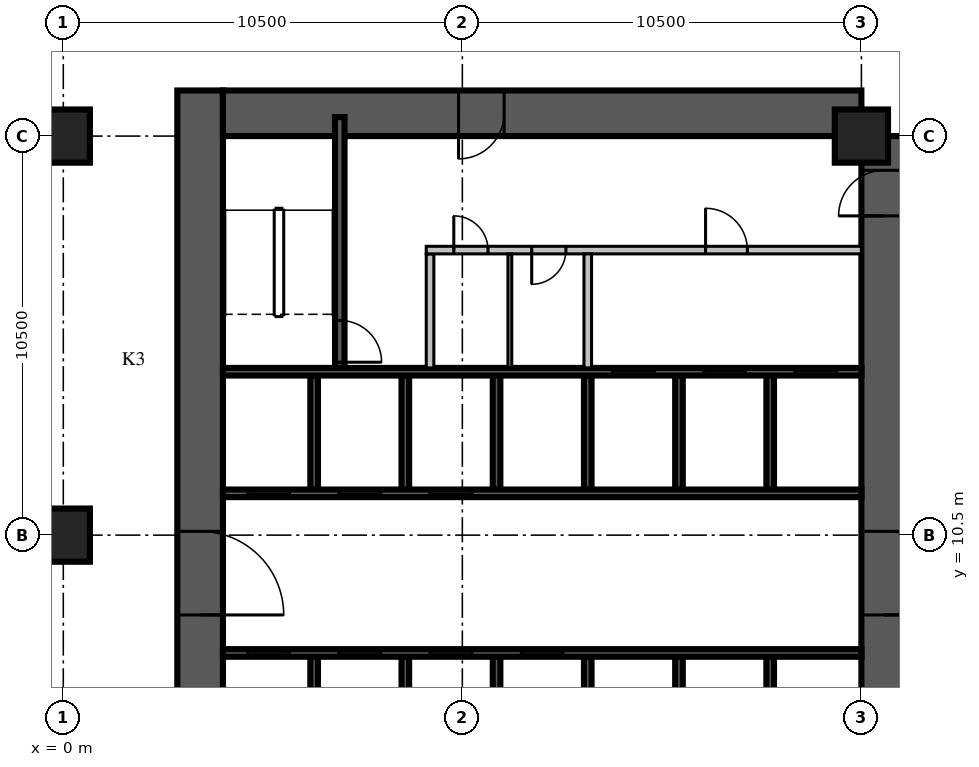
"""IFC4 building model, lengths in metres.
Left out: names, types, materials, properties, quantities, classifications, styles, units other than length and angle.
Written with IfcOpenShell. Run it as: python <this file> out.ifc"""

import sys

from ifc_helpers import new_model, si_unit, direction, frame, frame_2d, origin, origin_2d, place, context, subcontext, project, spatial, rectangle, extrude, source, transform, mapped, element, fill, save


model = new_model("IFC4")
c1 = context("Model", 3, precision=1e-05, world=origin(), true_north=direction((0.0, 1.0)))
c2 = subcontext(c1, "Body", "Model", "MODEL_VIEW")
j1 = project(units=[si_unit("LENGTHUNIT", "METRE"), si_unit("PLANEANGLEUNIT", "RADIAN")], contexts=[c1])
p1 = place(None, origin())
s1 = spatial("IfcSite", under=j1, at=p1, CompositionType="ELEMENT")
p2 = place(p1, origin())
s2 = spatial("IfcBuilding", under=s1, at=p2, CompositionType="ELEMENT")
p3 = place(p2, frame((0.0, 0.0, -9.0)))
s3 = spatial("IfcBuildingStorey", under=s2, at=p3, CompositionType="ELEMENT", Elevation=-9.0)
m1 = source(origin(), c2, "Body", "SweptSolid", [
    extrude(rectangle(XDim=1.4, YDim=1.4, at=origin_2d()), origin(), (0.0, 0.0, 1.0), 4.5),
])
for number, where, z_axis, x_axis in (
    (1, (0.0, 10.5, 0.0), (0.0, 0.0, 1.0), (1.0, 0.0, 0.0)),
    (2, (0.0, 21.0, 0.0), (0.0, 0.0, 1.0), (1.0, 0.0, 0.0)),
    (3, (21.0, 21.0, 0.0), (0.0, 0.0, 1.0), (1.0, 0.0, 0.0)),
):
    element("IfcColumn", number, at=place(p3, frame(where, z_axis=z_axis, x_axis=x_axis)), inside=s3, PredefinedType="COLUMN", context=c2, shape_type="MappedRepresentation", body=[
        mapped(m1, transform((0.0, 0.0, 0.0), scale=1.0)),
    ])
m2 = source(origin(), c2, "Body", "SweptSolid", [
    extrude(rectangle(XDim=18.0, YDim=1.2, at=frame_2d((9.0, 0.0))), origin(), (0.0, 0.0, 1.0), 4.5),
])
p4 = place(p3, frame((3.6, 4.2, 0.0), z_axis=(0.0, 0.0, 1.0), x_axis=(0.0, 1.0, 0.0)))
e4 = element("IfcWall", 4, at=p4, inside=s3, PredefinedType="SHEAR", context=c2, shape_type="MappedRepresentation", body=[
    mapped(m2, transform((0.0, 0.0, 0.0), scale=1.0)),
])
m3 = source(origin(), c2, "Body", "SweptSolid", [
    extrude(rectangle(XDim=2.2, YDim=2.1, at=frame_2d((1.1, 1.05))), frame((0.0, 0.61, 0.0), z_axis=(0.0, -1.0, 0.0), x_axis=(1.0, 0.0, 0.0)), (0.0, 0.0, 1.0), 1.22),
])
p5 = place(p4, frame((4.2, 0.0, 0.0)))
e5 = element("IfcOpeningElement", 5, at=p5, cuts=e4, PredefinedType="OPENING", context=c2, shape_type="MappedRepresentation", body=[
    mapped(m3, transform((0.0, 0.0, 0.0), scale=1.0)),
])
m4 = source(origin(), c2, "Body", "SweptSolid", [
    extrude(rectangle(XDim=16.8, YDim=1.2, at=frame_2d((8.4, 0.0))), origin(), (0.0, 0.0, 1.0), 4.5),
])
p6 = place(p3, frame((21.6, 4.2, 0.0), z_axis=(0.0, 0.0, 1.0), x_axis=(0.0, 1.0, 0.0)))
e6 = element("IfcWall", 6, at=p6, inside=s3, PredefinedType="SHEAR", context=c2, shape_type="MappedRepresentation", body=[
    mapped(m4, transform((0.0, 0.0, 0.0), scale=1.0)),
])
p7 = place(p6, frame((4.2, 0.0, 0.0)))
e7 = element("IfcOpeningElement", 7, at=p7, cuts=e6, PredefinedType="OPENING", context=c2, shape_type="MappedRepresentation", body=[
    mapped(m3, transform((0.0, 0.0, 0.0), scale=1.0)),
])
m5 = source(origin(), c2, "Body", "SweptSolid", [
    extrude(rectangle(XDim=1.2, YDim=2.1, at=frame_2d((0.6, 1.05))), frame((0.0, 0.61, 0.0), z_axis=(0.0, -1.0, 0.0), x_axis=(1.0, 0.0, 0.0)), (0.0, 0.0, 1.0), 1.22),
])
p8 = place(p6, frame((14.7, 0.0, 0.0)))
e8 = element("IfcOpeningElement", 8, at=p8, cuts=e6, PredefinedType="OPENING", context=c2, shape_type="MappedRepresentation", body=[
    mapped(m5, transform((0.0, 0.0, 0.0), scale=1.0)),
])
p9 = place(p3, frame((4.2, 21.6, 0.0), z_axis=(0.0, 0.0, 1.0), x_axis=(1.0, 0.0, 0.0)))
e9 = element("IfcWall", 9, at=p9, inside=s3, PredefinedType="SHEAR", context=c2, shape_type="MappedRepresentation", body=[
    mapped(m4, transform((0.0, 0.0, 0.0), scale=1.0)),
])
p10 = place(p9, frame((6.2, 0.0, 0.0)))
e10 = element("IfcOpeningElement", 10, at=p10, cuts=e9, PredefinedType="OPENING", context=c2, shape_type="MappedRepresentation", body=[
    mapped(m5, transform((0.0, 0.0, 0.0), scale=1.0)),
])
m6 = source(origin(), c2, "Body", "SweptSolid", [
    extrude(rectangle(XDim=3.1, YDim=0.2, at=frame_2d((1.55, 0.0))), origin(), (0.0, 0.0, 1.0), 4.5),
])
for number, where, z_axis, x_axis in (
    (11, (6.6, 4.2, 0.0), (0.0, 0.0, 1.0), (0.0, 1.0, 0.0)),
    (12, (9.0, 4.2, 0.0), (0.0, 0.0, 1.0), (0.0, 1.0, 0.0)),
    (13, (11.4, 4.2, 0.0), (0.0, 0.0, 1.0), (0.0, 1.0, 0.0)),
    (14, (13.8, 4.2, 0.0), (0.0, 0.0, 1.0), (0.0, 1.0, 0.0)),
    (15, (16.2, 4.2, 0.0), (0.0, 0.0, 1.0), (0.0, 1.0, 0.0)),
    (16, (18.6, 4.2, 0.0), (0.0, 0.0, 1.0), (0.0, 1.0, 0.0)),
):
    element("IfcWall", number, at=place(p3, frame(where, z_axis=z_axis, x_axis=x_axis)), inside=s3, PredefinedType="SOLIDWALL", context=c2, shape_type="MappedRepresentation", body=[
        mapped(m6, transform((0.0, 0.0, 0.0), scale=1.0)),
    ])
m7 = source(origin(), c2, "Body", "SweptSolid", [
    extrude(rectangle(XDim=3.0, YDim=0.2, at=frame_2d((1.5, 0.0))), origin(), (0.0, 0.0, 1.0), 4.5),
])
for number, where, z_axis, x_axis in (
    (17, (6.6, 11.7, 0.0), (0.0, 0.0, 1.0), (0.0, 1.0, 0.0)),
    (18, (9.0, 11.7, 0.0), (0.0, 0.0, 1.0), (0.0, 1.0, 0.0)),
    (19, (11.4, 11.7, 0.0), (0.0, 0.0, 1.0), (0.0, 1.0, 0.0)),
    (20, (13.8, 11.7, 0.0), (0.0, 0.0, 1.0), (0.0, 1.0, 0.0)),
    (21, (16.2, 11.7, 0.0), (0.0, 0.0, 1.0), (0.0, 1.0, 0.0)),
    (22, (18.6, 11.7, 0.0), (0.0, 0.0, 1.0), (0.0, 1.0, 0.0)),
):
    element("IfcWall", number, at=place(p3, frame(where, z_axis=z_axis, x_axis=x_axis)), inside=s3, PredefinedType="SOLIDWALL", context=c2, shape_type="MappedRepresentation", body=[
        mapped(m7, transform((0.0, 0.0, 0.0), scale=1.0)),
    ])
m8 = source(origin(), c2, "Body", "SweptSolid", [
    extrude(rectangle(XDim=16.8, YDim=0.2, at=frame_2d((8.4, 0.0))), origin(), (0.0, 0.0, 1.0), 4.5),
])
p11 = place(p3, frame((4.2, 7.4, 0.0), z_axis=(0.0, 0.0, 1.0), x_axis=(1.0, 0.0, 0.0)))
e23 = element("IfcWall", 23, at=p11, inside=s3, PredefinedType="SOLIDWALL", context=c2, shape_type="MappedRepresentation", body=[
    mapped(m8, transform((0.0, 0.0, 0.0), scale=1.0)),
])
m9 = source(origin(), c2, "Body", "SweptSolid", [
    extrude(rectangle(XDim=1.1, YDim=2.1, at=frame_2d((0.55, 1.05))), frame((0.0, 0.11, 0.0), z_axis=(0.0, -1.0, 0.0), x_axis=(1.0, 0.0, 0.0)), (0.0, 0.0, 1.0), 0.22),
])
p12 = place(p11, frame((0.65, 0.0, 0.0)))
e24 = element("IfcOpeningElement", 24, at=p12, cuts=e23, PredefinedType="OPENING", context=c2, shape_type="MappedRepresentation", body=[
    mapped(m9, transform((0.0, 0.0, 0.0), scale=1.0)),
])
p13 = place(p11, frame((3.05, 0.0, 0.0)))
e25 = element("IfcOpeningElement", 25, at=p13, cuts=e23, PredefinedType="OPENING", context=c2, shape_type="MappedRepresentation", body=[
    mapped(m9, transform((0.0, 0.0, 0.0), scale=1.0)),
])
p14 = place(p11, frame((5.45, 0.0, 0.0)))
e26 = element("IfcOpeningElement", 26, at=p14, cuts=e23, PredefinedType="OPENING", context=c2, shape_type="MappedRepresentation", body=[
    mapped(m9, transform((0.0, 0.0, 0.0), scale=1.0)),
])
p15 = place(p11, frame((7.85, 0.0, 0.0)))
e27 = element("IfcOpeningElement", 27, at=p15, cuts=e23, PredefinedType="OPENING", context=c2, shape_type="MappedRepresentation", body=[
    mapped(m9, transform((0.0, 0.0, 0.0), scale=1.0)),
])
p16 = place(p3, frame((4.2, 11.6, 0.0), z_axis=(0.0, 0.0, 1.0), x_axis=(1.0, 0.0, 0.0)))
e28 = element("IfcWall", 28, at=p16, inside=s3, PredefinedType="SOLIDWALL", context=c2, shape_type="MappedRepresentation", body=[
    mapped(m8, transform((0.0, 0.0, 0.0), scale=1.0)),
])
p17 = place(p16, frame((0.65, 0.0, 0.0)))
e29 = element("IfcOpeningElement", 29, at=p17, cuts=e28, PredefinedType="OPENING", context=c2, shape_type="MappedRepresentation", body=[
    mapped(m9, transform((0.0, 0.0, 0.0), scale=1.0)),
])
p18 = place(p16, frame((3.05, 0.0, 0.0)))
e30 = element("IfcOpeningElement", 30, at=p18, cuts=e28, PredefinedType="OPENING", context=c2, shape_type="MappedRepresentation", body=[
    mapped(m9, transform((0.0, 0.0, 0.0), scale=1.0)),
])
p19 = place(p16, frame((5.45, 0.0, 0.0)))
e31 = element("IfcOpeningElement", 31, at=p19, cuts=e28, PredefinedType="OPENING", context=c2, shape_type="MappedRepresentation", body=[
    mapped(m9, transform((0.0, 0.0, 0.0), scale=1.0)),
])
p20 = place(p3, frame((4.2, 14.8, 0.0), z_axis=(0.0, 0.0, 1.0), x_axis=(1.0, 0.0, 0.0)))
e32 = element("IfcWall", 32, at=p20, inside=s3, PredefinedType="SOLIDWALL", context=c2, shape_type="MappedRepresentation", body=[
    mapped(m8, transform((0.0, 0.0, 0.0), scale=1.0)),
])
p21 = place(p20, frame((10.25, 0.0, 0.0)))
e33 = element("IfcOpeningElement", 33, at=p21, cuts=e32, PredefinedType="OPENING", context=c2, shape_type="MappedRepresentation", body=[
    mapped(m9, transform((0.0, 0.0, 0.0), scale=1.0)),
])
p22 = place(p20, frame((12.65, 0.0, 0.0)))
e34 = element("IfcOpeningElement", 34, at=p22, cuts=e32, PredefinedType="OPENING", context=c2, shape_type="MappedRepresentation", body=[
    mapped(m9, transform((0.0, 0.0, 0.0), scale=1.0)),
])
p23 = place(p20, frame((15.05, 0.0, 0.0)))
e35 = element("IfcOpeningElement", 35, at=p23, cuts=e32, PredefinedType="OPENING", context=c2, shape_type="MappedRepresentation", body=[
    mapped(m9, transform((0.0, 0.0, 0.0), scale=1.0)),
])
m10 = source(origin(), c2, "Body", "SweptSolid", [
    extrude(rectangle(XDim=6.6, YDim=0.25, at=frame_2d((3.3, 0.0))), origin(), (0.0, 0.0, 1.0), 3.9),
])
p24 = place(p3, frame((7.275, 14.9, 0.0), z_axis=(0.0, 0.0, 1.0), x_axis=(0.0, 1.0, 0.0)))
e36 = element("IfcWall", 36, at=p24, inside=s3, PredefinedType="SOLIDWALL", context=c2, shape_type="MappedRepresentation", body=[
    mapped(m10, transform((0.0, 0.0, 0.0), scale=1.0)),
])
m11 = source(origin(), c2, "Body", "SweptSolid", [
    extrude(rectangle(XDim=1.1, YDim=2.1, at=frame_2d((0.55, 1.05))), frame((0.0, 0.135, 0.0), z_axis=(0.0, -1.0, 0.0), x_axis=(1.0, 0.0, 0.0)), (0.0, 0.0, 1.0), 0.27),
])
p25 = place(p24, frame((0.15, 0.0, 0.0)))
e37 = element("IfcOpeningElement", 37, at=p25, cuts=e36, PredefinedType="OPENING", context=c2, shape_type="MappedRepresentation", body=[
    mapped(m11, transform((0.0, 0.0, 0.0), scale=1.0)),
])
m12 = source(origin(), c2, "Body", "SweptSolid", [
    extrude(rectangle(XDim=3.0, YDim=0.2, at=frame_2d((1.5, 0.0))), origin(), (0.0, 0.0, 1.0), 3.9),
])
p26 = place(p3, frame((9.65, 14.9, 0.0), z_axis=(0.0, 0.0, 1.0), x_axis=(0.0, 1.0, 0.0)))
e38 = element("IfcWall", 38, at=p26, inside=s3, PredefinedType="PARTITIONING", context=c2, shape_type="MappedRepresentation", body=[
    mapped(m12, transform((0.0, 0.0, 0.0), scale=1.0)),
])
m13 = source(origin(), c2, "Body", "SweptSolid", [
    extrude(rectangle(XDim=11.45, YDim=0.2, at=frame_2d((5.725, 0.0))), origin(), (0.0, 0.0, 1.0), 3.9),
])
p27 = place(p3, frame((9.55, 18.0, 0.0), z_axis=(0.0, 0.0, 1.0), x_axis=(1.0, 0.0, 0.0)))
e39 = element("IfcWall", 39, at=p27, inside=s3, PredefinedType="PARTITIONING", context=c2, shape_type="MappedRepresentation", body=[
    mapped(m13, transform((0.0, 0.0, 0.0), scale=1.0)),
])
m14 = source(origin(), c2, "Body", "SweptSolid", [
    extrude(rectangle(XDim=0.9, YDim=2.1, at=frame_2d((0.45, 1.05))), frame((0.0, 0.11, 0.0), z_axis=(0.0, -1.0, 0.0), x_axis=(1.0, 0.0, 0.0)), (0.0, 0.0, 1.0), 0.22),
])
p28 = place(p27, frame((0.725, 0.0, 0.0)))
e40 = element("IfcOpeningElement", 40, at=p28, cuts=e39, PredefinedType="OPENING", context=c2, shape_type="MappedRepresentation", body=[
    mapped(m14, transform((0.0, 0.0, 0.0), scale=1.0)),
])
p29 = place(p27, frame((2.775, 0.0, 0.0)))
e41 = element("IfcOpeningElement", 41, at=p29, cuts=e39, PredefinedType="OPENING", context=c2, shape_type="MappedRepresentation", body=[
    mapped(m14, transform((0.0, 0.0, 0.0), scale=1.0)),
])
p30 = place(p27, frame((7.35, 0.0, 0.0)))
e42 = element("IfcOpeningElement", 42, at=p30, cuts=e39, PredefinedType="OPENING", context=c2, shape_type="MappedRepresentation", body=[
    mapped(m9, transform((0.0, 0.0, 0.0), scale=1.0)),
])
p31 = place(p3, frame((13.8, 14.9, 0.0), z_axis=(0.0, 0.0, 1.0), x_axis=(0.0, 1.0, 0.0)))
e43 = element("IfcWall", 43, at=p31, inside=s3, PredefinedType="PARTITIONING", context=c2, shape_type="MappedRepresentation", body=[
    mapped(m12, transform((0.0, 0.0, 0.0), scale=1.0)),
])
m15 = source(origin(), c2, "Body", "SweptSolid", [
    extrude(rectangle(XDim=3.0, YDim=0.1, at=frame_2d((1.5, 0.0))), origin(), (0.0, 0.0, 1.0), 3.9),
])
p32 = place(p3, frame((11.75, 14.9, 0.0), z_axis=(0.0, 0.0, 1.0), x_axis=(0.0, 1.0, 0.0)))
e44 = element("IfcWall", 44, at=p32, inside=s3, PredefinedType="PARTITIONING", context=c2, shape_type="MappedRepresentation", body=[
    mapped(m15, transform((0.0, 0.0, 0.0), scale=1.0)),
])
m16 = source(origin(), c2, "Body", "SweptSolid", [
    extrude(rectangle(XDim=1.1, YDim=2.1, at=frame_2d((0.55, 1.05))), frame((0.0, 0.025, 0.0), z_axis=(0.0, -1.0, 0.0), x_axis=(1.0, 0.0, 0.0)), (0.0, 0.0, 1.0), 0.05),
])
p33 = place(p12, origin())
e45 = element("IfcDoor", 45, at=p33, inside=s3, OperationType="SLIDING_TO_LEFT", PredefinedType="DOOR", context=c2, shape_type="MappedRepresentation", body=[
    mapped(m16, transform((0.0, 0.0, 0.0), scale=1.0)),
])
fill(e24, e45)
p34 = place(p13, origin())
e46 = element("IfcDoor", 46, at=p34, inside=s3, OperationType="SLIDING_TO_LEFT", PredefinedType="DOOR", context=c2, shape_type="MappedRepresentation", body=[
    mapped(m16, transform((0.0, 0.0, 0.0), scale=1.0)),
])
fill(e25, e46)
p35 = place(p14, origin())
e47 = element("IfcDoor", 47, at=p35, inside=s3, OperationType="SLIDING_TO_LEFT", PredefinedType="DOOR", context=c2, shape_type="MappedRepresentation", body=[
    mapped(m16, transform((0.0, 0.0, 0.0), scale=1.0)),
])
fill(e26, e47)
p36 = place(p15, origin())
e48 = element("IfcDoor", 48, at=p36, inside=s3, OperationType="SLIDING_TO_LEFT", PredefinedType="DOOR", context=c2, shape_type="MappedRepresentation", body=[
    mapped(m16, transform((0.0, 0.0, 0.0), scale=1.0)),
])
fill(e27, e48)
p37 = place(p17, origin())
e49 = element("IfcDoor", 49, at=p37, inside=s3, OperationType="SLIDING_TO_LEFT", PredefinedType="DOOR", context=c2, shape_type="MappedRepresentation", body=[
    mapped(m16, transform((0.0, 0.0, 0.0), scale=1.0)),
])
fill(e29, e49)
p38 = place(p18, origin())
e50 = element("IfcDoor", 50, at=p38, inside=s3, OperationType="SLIDING_TO_LEFT", PredefinedType="DOOR", context=c2, shape_type="MappedRepresentation", body=[
    mapped(m16, transform((0.0, 0.0, 0.0), scale=1.0)),
])
fill(e30, e50)
p39 = place(p19, origin())
e51 = element("IfcDoor", 51, at=p39, inside=s3, OperationType="SLIDING_TO_LEFT", PredefinedType="DOOR", context=c2, shape_type="MappedRepresentation", body=[
    mapped(m16, transform((0.0, 0.0, 0.0), scale=1.0)),
])
fill(e31, e51)
p40 = place(p21, origin())
e52 = element("IfcDoor", 52, at=p40, inside=s3, OperationType="SLIDING_TO_LEFT", PredefinedType="DOOR", context=c2, shape_type="MappedRepresentation", body=[
    mapped(m16, transform((0.0, 0.0, 0.0), scale=1.0)),
])
fill(e33, e52)
p41 = place(p22, origin())
e53 = element("IfcDoor", 53, at=p41, inside=s3, OperationType="SLIDING_TO_LEFT", PredefinedType="DOOR", context=c2, shape_type="MappedRepresentation", body=[
    mapped(m16, transform((0.0, 0.0, 0.0), scale=1.0)),
])
fill(e34, e53)
p42 = place(p23, origin())
e54 = element("IfcDoor", 54, at=p42, inside=s3, OperationType="SLIDING_TO_LEFT", PredefinedType="DOOR", context=c2, shape_type="MappedRepresentation", body=[
    mapped(m16, transform((0.0, 0.0, 0.0), scale=1.0)),
])
fill(e35, e54)
p43 = place(p25, origin())
e55 = element("IfcDoor", 55, at=p43, inside=s3, OperationType="SINGLE_SWING_RIGHT", PredefinedType="DOOR", context=c2, shape_type="MappedRepresentation", body=[
    mapped(m16, transform((0.0, 0.0, 0.0), scale=1.0)),
])
fill(e37, e55)
m17 = source(origin(), c2, "Body", "SweptSolid", [
    extrude(rectangle(XDim=0.9, YDim=2.1, at=frame_2d((0.45, 1.05))), frame((0.0, 0.025, 0.0), z_axis=(0.0, -1.0, 0.0), x_axis=(1.0, 0.0, 0.0)), (0.0, 0.0, 1.0), 0.05),
])
p44 = place(p28, origin())
e56 = element("IfcDoor", 56, at=p44, inside=s3, OperationType="SINGLE_SWING_LEFT", PredefinedType="DOOR", context=c2, shape_type="MappedRepresentation", body=[
    mapped(m17, transform((0.0, 0.0, 0.0), scale=1.0)),
])
fill(e40, e56)
p45 = place(p29, origin())
e57 = element("IfcDoor", 57, at=p45, inside=s3, OperationType="SINGLE_SWING_RIGHT", PredefinedType="DOOR", context=c2, shape_type="MappedRepresentation", body=[
    mapped(m17, transform((0.0, 0.0, 0.0), scale=1.0)),
])
fill(e41, e57)
p46 = place(p30, origin())
e58 = element("IfcDoor", 58, at=p46, inside=s3, OperationType="SINGLE_SWING_LEFT", PredefinedType="DOOR", context=c2, shape_type="MappedRepresentation", body=[
    mapped(m16, transform((0.0, 0.0, 0.0), scale=1.0)),
])
fill(e42, e58)
m18 = source(origin(), c2, "Body", "SweptSolid", [
    extrude(rectangle(XDim=2.2, YDim=2.1, at=frame_2d((1.1, 1.05))), frame((0.0, 0.025, 0.0), z_axis=(0.0, -1.0, 0.0), x_axis=(1.0, 0.0, 0.0)), (0.0, 0.0, 1.0), 0.05),
])
p47 = place(p7, origin())
e59 = element("IfcDoor", 59, at=p47, inside=s3, OperationType="DOUBLE_DOOR_SINGLE_SWING", PredefinedType="DOOR", context=c2, shape_type="MappedRepresentation", body=[
    mapped(m18, transform((0.0, 0.0, 0.0), scale=1.0)),
])
fill(e7, e59)
p48 = place(p5, origin())
e60 = element("IfcDoor", 60, at=p48, inside=s3, OperationType="DOUBLE_DOOR_SINGLE_SWING", PredefinedType="DOOR", context=c2, shape_type="MappedRepresentation", body=[
    mapped(m18, transform((0.0, 0.0, 0.0), scale=1.0)),
])
fill(e5, e60)
m19 = source(origin(), c2, "Body", "SweptSolid", [
    extrude(rectangle(XDim=1.2, YDim=2.1, at=frame_2d((0.6, 1.05))), frame((0.0, 0.025, 0.0), z_axis=(0.0, -1.0, 0.0), x_axis=(1.0, 0.0, 0.0)), (0.0, 0.0, 1.0), 0.05),
])
p49 = place(p10, origin())
e61 = element("IfcDoor", 61, at=p49, inside=s3, OperationType="SINGLE_SWING_RIGHT", PredefinedType="DOOR", context=c2, shape_type="MappedRepresentation", body=[
    mapped(m19, transform((0.0, 0.0, 0.0), scale=1.0)),
])
fill(e10, e61)
p50 = place(p8, origin())
e62 = element("IfcDoor", 62, at=p50, inside=s3, OperationType="SINGLE_SWING_LEFT", PredefinedType="DOOR", context=c2, shape_type="MappedRepresentation", body=[
    mapped(m19, transform((0.0, 0.0, 0.0), scale=1.0)),
])
fill(e8, e62)
save(model, sys.argv[1])
